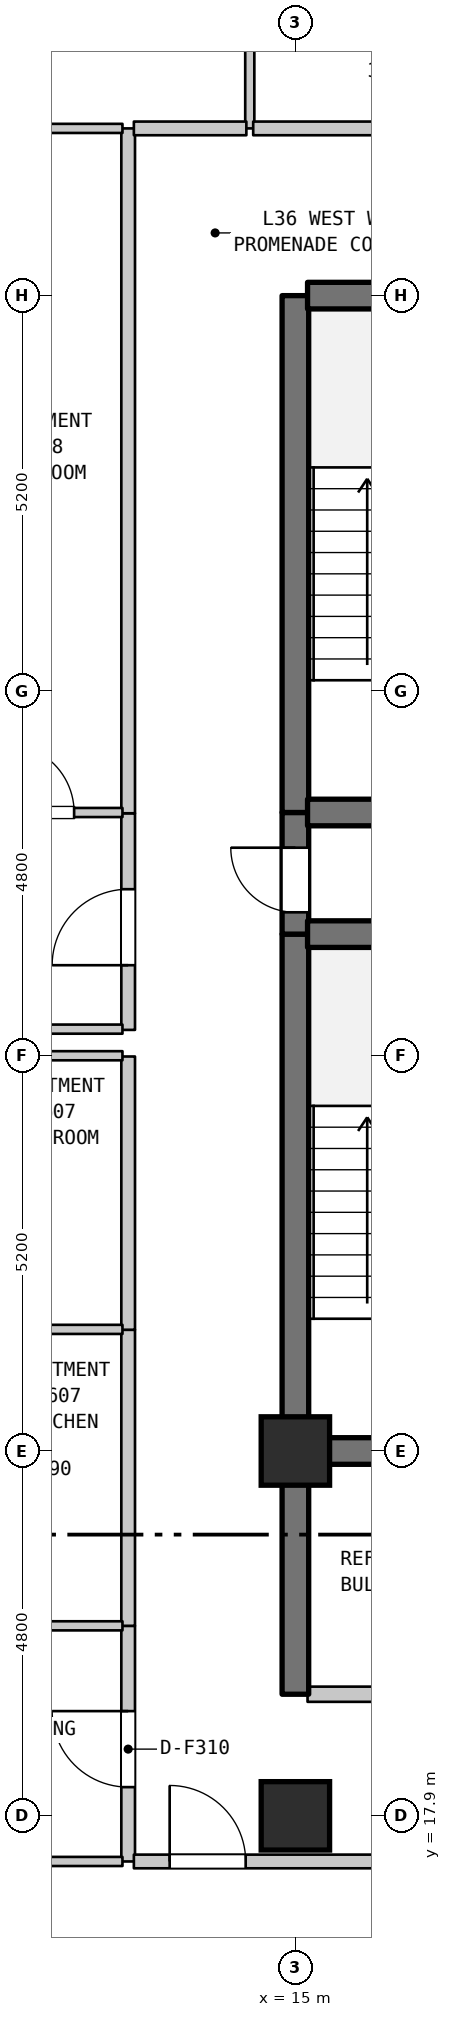
"""IFC4 building model, lengths in metres.
Left out: names, types, materials, properties, quantities, classifications, styles, units other than length and angle.
Written with IfcOpenShell. Run it as: python <this file> out.ifc"""

import sys

from ifc_helpers import new_model, si_unit, direction, frame, frame_2d, origin, origin_2d, place, context, subcontext, project, spatial, rectangle, extrude, element, fill, save


model = new_model("IFC4")
c1 = context("Model", 3, precision=1e-05, world=origin(), true_north=direction((0.0, 1.0)))
c2 = subcontext(c1, "Body", "Model", "MODEL_VIEW")
j1 = project(units=[si_unit("LENGTHUNIT", "METRE"), si_unit("PLANEANGLEUNIT", "RADIAN")], contexts=[c1])
p1 = place(None, origin())
s1 = spatial("IfcSite", under=j1, at=p1, CompositionType="ELEMENT")
p2 = place(p1, origin())
s2 = spatial("IfcBuilding", under=s1, at=p2, CompositionType="ELEMENT")
p3 = place(p2, frame((0.0, 0.0, 148.3)))
s3 = spatial("IfcBuildingStorey", under=s2, at=p3, CompositionType="ELEMENT", Elevation=148.3)
for number, where, z_axis, x_axis in (
    (1, (15.0, 17.9, 0.0), (0.0, 0.0, 1.0), (1.0, 0.0, 0.0)),
    (2, (15.0, 22.7, 0.0), (0.0, 0.0, 1.0), (1.0, 0.0, 0.0)),
):
    element("IfcColumn", number, at=place(p3, frame(where, z_axis=z_axis, x_axis=x_axis)), inside=s3, PredefinedType="COLUMN", context=c2, shape_type="SweptSolid", body=[
        extrude(rectangle(XDim=0.9, YDim=0.9, at=origin_2d()), origin(), (0.0, 0.0, 1.0), 3.7),
    ])
p4 = place(p3, frame((12.8, 17.3, 0.0), z_axis=(0.0, 0.0, 1.0), x_axis=(0.0, 1.0, 0.0)))
e3 = element("IfcWall", 3, at=p4, inside=s3, PredefinedType="STANDARD", context=c2, shape_type="SweptSolid", body=[
    extrude(rectangle(XDim=3.1, YDim=0.18, at=frame_2d((1.55, 0.0))), origin(), (0.0, 0.0, 1.0), 3.385),
])
p5 = place(p4, frame((0.978, 0.0, 0.0)))
e4 = element("IfcOpeningElement", 4, at=p5, cuts=e3, PredefinedType="OPENING", context=c2, shape_type="SweptSolid", body=[
    extrude(rectangle(XDim=1.0, YDim=2.15, at=frame_2d((0.5, 1.075))), frame((0.0, 0.1, 0.0), z_axis=(0.0, -1.0, 0.0), x_axis=(1.0, 0.0, 0.0)), (0.0, 0.0, 1.0), 0.2),
])
p6 = place(p3, frame((12.8, 20.4, 0.0), z_axis=(0.0, 0.0, 1.0), x_axis=(0.0, 1.0, 0.0)))
e5 = element("IfcWall", 5, at=p6, inside=s3, PredefinedType="STANDARD", context=c2, shape_type="SweptSolid", body=[
    extrude(rectangle(XDim=3.895, YDim=0.18, at=frame_2d((1.948, 0.0))), origin(), (0.0, 0.0, 1.0), 3.385),
])
p7 = place(p3, frame((12.8, 24.295, 0.0), z_axis=(0.0, 0.0, 1.0), x_axis=(0.0, 1.0, 0.0)))
e6 = element("IfcWall", 6, at=p7, inside=s3, PredefinedType="STANDARD", context=c2, shape_type="SweptSolid", body=[
    extrude(rectangle(XDim=3.595, YDim=0.18, at=frame_2d((1.797, 0.0))), origin(), (0.0, 0.0, 1.0), 3.385),
])
p8 = place(p3, frame((12.8, 28.24, 0.0), z_axis=(0.0, 0.0, 1.0), x_axis=(0.0, 1.0, 0.0)))
e7 = element("IfcWall", 7, at=p8, inside=s3, PredefinedType="STANDARD", context=c2, shape_type="SweptSolid", body=[
    extrude(rectangle(XDim=2.85, YDim=0.18, at=frame_2d((1.425, 0.0))), origin(), (0.0, 0.0, 1.0), 3.385),
])
p9 = place(p8, frame((0.851, 0.0, 0.0)))
e8 = element("IfcOpeningElement", 8, at=p9, cuts=e7, PredefinedType="OPENING", context=c2, shape_type="SweptSolid", body=[
    extrude(rectangle(XDim=1.0, YDim=2.15, at=frame_2d((0.5, 1.075))), frame((0.0, 0.1, 0.0), z_axis=(0.0, -1.0, 0.0), x_axis=(1.0, 0.0, 0.0)), (0.0, 0.0, 1.0), 0.2),
])
p10 = place(p3, frame((12.8, 31.09, 0.0), z_axis=(0.0, 0.0, 1.0), x_axis=(0.0, 1.0, 0.0)))
e9 = element("IfcWall", 9, at=p10, inside=s3, PredefinedType="STANDARD", context=c2, shape_type="SweptSolid", body=[
    extrude(rectangle(XDim=9.01, YDim=0.18, at=frame_2d((4.505, 0.0))), origin(), (0.0, 0.0, 1.0), 3.385),
])
p11 = place(p3, frame((14.4, 40.1, 0.0), z_axis=(0.0, 0.0, 1.0), x_axis=(0.0, 1.0, 0.0)))
e10 = element("IfcWall", 10, at=p11, inside=s3, PredefinedType="PARTITIONING", context=c2, shape_type="SweptSolid", body=[
    extrude(rectangle(XDim=2.3, YDim=0.12, at=frame_2d((1.15, 0.0))), origin(), (0.0, 0.0, 1.0), 3.385),
])
p12 = place(p3, frame((15.0, 19.5, 0.0), z_axis=(0.0, 0.0, 1.0), x_axis=(0.0, 1.0, 0.0)))
e11 = element("IfcWall", 11, at=p12, inside=s3, PredefinedType="SHEAR", context=c2, shape_type="SweptSolid", body=[
    extrude(rectangle(XDim=3.2, YDim=0.35, at=frame_2d((1.6, 0.0))), origin(), (0.0, 0.0, 1.0), 3.385),
])
p13 = place(p3, frame((15.0, 22.7, 0.0), z_axis=(0.0, 0.0, 1.0), x_axis=(0.0, 1.0, 0.0)))
e12 = element("IfcWall", 12, at=p13, inside=s3, PredefinedType="SHEAR", context=c2, shape_type="SweptSolid", body=[
    extrude(rectangle(XDim=6.8, YDim=0.35, at=frame_2d((3.4, 0.0))), origin(), (0.0, 0.0, 1.0), 3.385),
])
p14 = place(p3, frame((15.0, 29.5, 0.0), z_axis=(0.0, 0.0, 1.0), x_axis=(0.0, 1.0, 0.0)))
e13 = element("IfcWall", 13, at=p14, inside=s3, PredefinedType="SHEAR", context=c2, shape_type="SweptSolid", body=[
    extrude(rectangle(XDim=1.6, YDim=0.35, at=frame_2d((0.8, 0.0))), origin(), (0.0, 0.0, 1.0), 3.385),
])
p15 = place(p14, frame((0.287, 0.0, 0.0)))
e14 = element("IfcOpeningElement", 14, at=p15, cuts=e13, PredefinedType="OPENING", context=c2, shape_type="SweptSolid", body=[
    extrude(rectangle(XDim=0.85, YDim=2.1, at=frame_2d((0.425, 1.05))), frame((0.0, 0.185, 0.0), z_axis=(0.0, -1.0, 0.0), x_axis=(1.0, 0.0, 0.0)), (0.0, 0.0, 1.0), 0.37),
])
p16 = place(p3, frame((15.0, 31.1, 0.0), z_axis=(0.0, 0.0, 1.0), x_axis=(0.0, 1.0, 0.0)))
e15 = element("IfcWall", 15, at=p16, inside=s3, PredefinedType="SHEAR", context=c2, shape_type="SweptSolid", body=[
    extrude(rectangle(XDim=6.8, YDim=0.35, at=frame_2d((3.4, 0.0))), origin(), (0.0, 0.0, 1.0), 3.385),
])
p17 = place(p3, frame((9.085, 17.3, 0.0), z_axis=(0.0, 0.0, 1.0), x_axis=(1.0, 0.0, 0.0)))
e16 = element("IfcWall", 16, at=p17, inside=s3, PredefinedType="PARTITIONING", context=c2, shape_type="SweptSolid", body=[
    extrude(rectangle(XDim=3.64, YDim=0.12, at=frame_2d((1.82, 0.0))), origin(), (0.0, 0.0, 1.0), 3.385),
])
p18 = place(p3, frame((12.875, 17.3, 0.0), z_axis=(0.0, 0.0, 1.0), x_axis=(1.0, 0.0, 0.0)))
e17 = element("IfcWall", 17, at=p18, inside=s3, PredefinedType="STANDARD", context=c2, shape_type="SweptSolid", body=[
    extrude(rectangle(XDim=3.28, YDim=0.18, at=frame_2d((1.64, 0.0))), origin(), (0.0, 0.0, 1.0), 3.385),
])
p19 = place(p18, frame((0.471, 0.0, 0.0)))
e18 = element("IfcOpeningElement", 18, at=p19, cuts=e17, PredefinedType="OPENING", context=c2, shape_type="SweptSolid", body=[
    extrude(rectangle(XDim=1.0, YDim=2.15, at=frame_2d((0.5, 1.075))), frame((0.0, 0.1, 0.0), z_axis=(0.0, -1.0, 0.0), x_axis=(1.0, 0.0, 0.0)), (0.0, 0.0, 1.0), 0.2),
])
p20 = place(p3, frame((15.16, 19.5, 0.0), z_axis=(0.0, 0.0, 1.0), x_axis=(1.0, 0.0, 0.0)))
e19 = element("IfcWall", 19, at=p20, inside=s3, PredefinedType="STANDARD", context=c2, shape_type="SweptSolid", body=[
    extrude(rectangle(XDim=3.68, YDim=0.2, at=frame_2d((1.84, 0.0))), origin(), (0.0, 0.0, 1.0), 3.385),
])
p21 = place(p20, frame((1.39, 0.0, 0.0)))
e20 = element("IfcOpeningElement", 20, at=p21, cuts=e19, PredefinedType="OPENING", context=c2, shape_type="SweptSolid", body=[
    extrude(rectangle(XDim=0.9, YDim=2.15, at=frame_2d((0.45, 1.075))), frame((0.0, 0.11, 0.0), z_axis=(0.0, -1.0, 0.0), x_axis=(1.0, 0.0, 0.0)), (0.0, 0.0, 1.0), 0.22),
])
p22 = place(p3, frame((10.595, 20.4, 0.0), z_axis=(0.0, 0.0, 1.0), x_axis=(1.0, 0.0, 0.0)))
e21 = element("IfcWall", 21, at=p22, inside=s3, PredefinedType="PARTITIONING", context=c2, shape_type="SweptSolid", body=[
    extrude(rectangle(XDim=2.13, YDim=0.12, at=frame_2d((1.065, 0.0))), origin(), (0.0, 0.0, 1.0), 3.385),
])
p23 = place(p3, frame((15.16, 22.7, 0.0), z_axis=(0.0, 0.0, 1.0), x_axis=(1.0, 0.0, 0.0)))
e22 = element("IfcWall", 22, at=p23, inside=s3, PredefinedType="SHEAR", context=c2, shape_type="SweptSolid", body=[
    extrude(rectangle(XDim=3.68, YDim=0.35, at=frame_2d((1.84, 0.0))), origin(), (0.0, 0.0, 1.0), 3.385),
])
for number, where, z_axis, x_axis in (
    (23, (10.595, 24.3, 0.0), (0.0, 0.0, 1.0), (1.0, 0.0, 0.0)),
    (24, (10.595, 27.9, 0.0), (0.0, 0.0, 1.0), (1.0, 0.0, 0.0)),
):
    element("IfcWall", number, at=place(p3, frame(where, z_axis=z_axis, x_axis=x_axis)), inside=s3, PredefinedType="PARTITIONING", context=c2, shape_type="SweptSolid", body=[
        extrude(rectangle(XDim=2.13, YDim=0.12, at=frame_2d((1.065, 0.0))), origin(), (0.0, 0.0, 1.0), 3.385),
    ])
p24 = place(p3, frame((9.03, 28.25, 0.0), z_axis=(0.0, 0.0, 1.0), x_axis=(1.0, 0.0, 0.0)))
e25 = element("IfcWall", 25, at=p24, inside=s3, PredefinedType="PARTITIONING", context=c2, shape_type="SweptSolid", body=[
    extrude(rectangle(XDim=3.695, YDim=0.12, at=frame_2d((1.848, 0.0))), origin(), (0.0, 0.0, 1.0), 3.385),
])
p25 = place(p3, frame((15.16, 29.5, 0.0), z_axis=(0.0, 0.0, 1.0), x_axis=(1.0, 0.0, 0.0)))
e26 = element("IfcWall", 26, at=p25, inside=s3, PredefinedType="SHEAR", context=c2, shape_type="SweptSolid", body=[
    extrude(rectangle(XDim=3.68, YDim=0.35, at=frame_2d((1.84, 0.0))), origin(), (0.0, 0.0, 1.0), 3.385),
])
p26 = place(p3, frame((10.523, 31.1, 0.0), z_axis=(0.0, 0.0, 1.0), x_axis=(1.0, 0.0, 0.0)))
e27 = element("IfcWall", 27, at=p26, inside=s3, PredefinedType="PARTITIONING", context=c2, shape_type="SweptSolid", body=[
    extrude(rectangle(XDim=2.202, YDim=0.12, at=frame_2d((1.101, 0.0))), origin(), (0.0, 0.0, 1.0), 3.385),
])
p27 = place(p26, frame((0.666, 0.0, 0.0)))
e28 = element("IfcOpeningElement", 28, at=p27, cuts=e27, PredefinedType="OPENING", context=c2, shape_type="SweptSolid", body=[
    extrude(rectangle(XDim=0.9, YDim=2.1, at=frame_2d((0.45, 1.05))), frame((0.0, 0.07, 0.0), z_axis=(0.0, -1.0, 0.0), x_axis=(1.0, 0.0, 0.0)), (0.0, 0.0, 1.0), 0.14),
])
for number, where, z_axis, x_axis in (
    (29, (15.16, 31.1, 0.0), (0.0, 0.0, 1.0), (1.0, 0.0, 0.0)),
    (30, (15.16, 37.9, 0.0), (0.0, 0.0, 1.0), (1.0, 0.0, 0.0)),
):
    element("IfcWall", number, at=place(p3, frame(where, z_axis=z_axis, x_axis=x_axis)), inside=s3, PredefinedType="SHEAR", context=c2, shape_type="SweptSolid", body=[
        extrude(rectangle(XDim=3.68, YDim=0.35, at=frame_2d((1.84, 0.0))), origin(), (0.0, 0.0, 1.0), 3.385),
    ])
p28 = place(p3, frame((10.523, 40.1, 0.0), z_axis=(0.0, 0.0, 1.0), x_axis=(1.0, 0.0, 0.0)))
e31 = element("IfcWall", 31, at=p28, inside=s3, PredefinedType="PARTITIONING", context=c2, shape_type="SweptSolid", body=[
    extrude(rectangle(XDim=2.202, YDim=0.12, at=frame_2d((1.101, 0.0))), origin(), (0.0, 0.0, 1.0), 3.385),
])
p29 = place(p3, frame((12.875, 40.1, 0.0), z_axis=(0.0, 0.0, 1.0), x_axis=(1.0, 0.0, 0.0)))
e32 = element("IfcWall", 32, at=p29, inside=s3, PredefinedType="STANDARD", context=c2, shape_type="SweptSolid", body=[
    extrude(rectangle(XDim=1.48, YDim=0.18, at=frame_2d((0.74, 0.0))), origin(), (0.0, 0.0, 1.0), 3.385),
])
p30 = place(p3, frame((14.445, 40.1, 0.0), z_axis=(0.0, 0.0, 1.0), x_axis=(1.0, 0.0, 0.0)))
e33 = element("IfcWall", 33, at=p30, inside=s3, PredefinedType="STANDARD", context=c2, shape_type="SweptSolid", body=[
    extrude(rectangle(XDim=3.489, YDim=0.18, at=frame_2d((1.745, 0.0))), origin(), (0.0, 0.0, 1.0), 3.385),
])
p31 = place(p5, origin())
e34 = element("IfcDoor", 34, at=p31, inside=s3, OperationType="SINGLE_SWING_RIGHT", PredefinedType="DOOR", context=c2, shape_type="SweptSolid", body=[
    extrude(rectangle(XDim=1.0, YDim=2.15, at=frame_2d((0.5, 1.075))), frame((0.0, 0.025, 0.0), z_axis=(0.0, -1.0, 0.0), x_axis=(1.0, 0.0, 0.0)), (0.0, 0.0, 1.0), 0.05),
])
fill(e4, e34)
p32 = place(p9, origin())
e35 = element("IfcDoor", 35, at=p32, inside=s3, OperationType="SINGLE_SWING_LEFT", PredefinedType="DOOR", context=c2, shape_type="SweptSolid", body=[
    extrude(rectangle(XDim=1.0, YDim=2.15, at=frame_2d((0.5, 1.075))), frame((0.0, 0.025, 0.0), z_axis=(0.0, -1.0, 0.0), x_axis=(1.0, 0.0, 0.0)), (0.0, 0.0, 1.0), 0.05),
])
fill(e8, e35)
p33 = place(p15, origin())
e36 = element("IfcDoor", 36, at=p33, inside=s3, OperationType="SINGLE_SWING_RIGHT", PredefinedType="DOOR", context=c2, shape_type="SweptSolid", body=[
    extrude(rectangle(XDim=0.85, YDim=2.1, at=frame_2d((0.425, 1.05))), frame((0.0, 0.025, 0.0), z_axis=(0.0, -1.0, 0.0), x_axis=(1.0, 0.0, 0.0)), (0.0, 0.0, 1.0), 0.05),
])
fill(e14, e36)
p34 = place(p19, origin())
e37 = element("IfcDoor", 37, at=p34, inside=s3, OperationType="SINGLE_SWING_LEFT", PredefinedType="DOOR", context=c2, shape_type="SweptSolid", body=[
    extrude(rectangle(XDim=1.0, YDim=2.15, at=frame_2d((0.5, 1.075))), frame((0.0, 0.025, 0.0), z_axis=(0.0, -1.0, 0.0), x_axis=(1.0, 0.0, 0.0)), (0.0, 0.0, 1.0), 0.05),
])
fill(e18, e37)
p35 = place(p27, origin())
e38 = element("IfcDoor", 38, at=p35, inside=s3, OperationType="SINGLE_SWING_LEFT", PredefinedType="DOOR", context=c2, shape_type="SweptSolid", body=[
    extrude(rectangle(XDim=0.9, YDim=2.1, at=frame_2d((0.45, 1.05))), frame((0.0, 0.025, 0.0), z_axis=(0.0, -1.0, 0.0), x_axis=(1.0, 0.0, 0.0)), (0.0, 0.0, 1.0), 0.05),
])
fill(e28, e38)
save(model, sys.argv[1])
